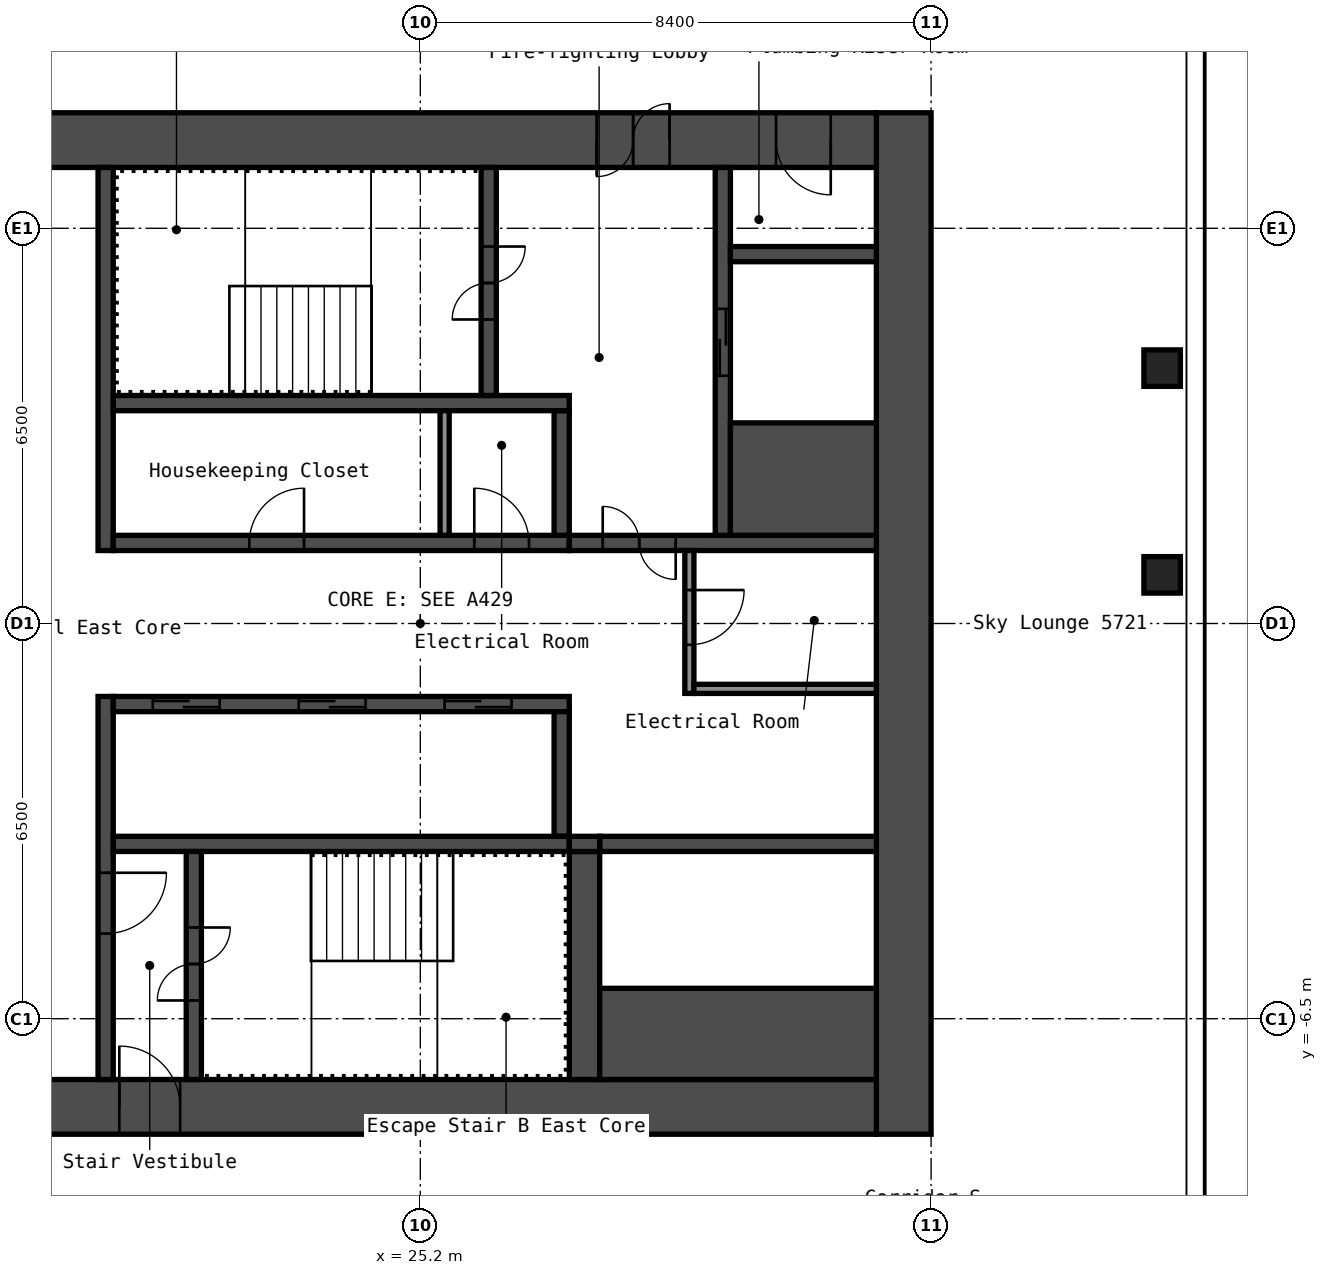
"""IFC4 building model, lengths in metres.
Left out: names, types, materials, properties, quantities, classifications, styles, units other than length and angle.
Written with IfcOpenShell. Run it as: python <this file> out.ifc"""

import sys

from ifc_helpers import new_model, si_unit, direction, frame, frame_2d, origin, origin_2d, place, context, subcontext, project, spatial, rectangle, hollow_rectangle, extrude, element, fill, save


model = new_model("IFC4")
c1 = context("Model", 3, precision=1e-05, world=origin(), true_north=direction((0.0, 1.0)))
c2 = subcontext(c1, "Body", "Model", "MODEL_VIEW")
j1 = project(units=[si_unit("LENGTHUNIT", "METRE"), si_unit("PLANEANGLEUNIT", "RADIAN")], contexts=[c1])
p1 = place(None, origin())
s1 = spatial("IfcSite", under=j1, at=p1, CompositionType="ELEMENT")
p2 = place(p1, origin())
s2 = spatial("IfcBuilding", under=s1, at=p2, CompositionType="ELEMENT")
p3 = place(p2, frame((0.0, 0.0, 202.6)))
s3 = spatial("IfcBuildingStorey", under=s2, at=p3, CompositionType="ELEMENT", Elevation=202.6)
for number, where, z_axis, x_axis in (
    (1, (37.4, 0.8, 0.0), (0.0, 0.0, 1.0), (1.0, 0.0, 0.0)),
    (2, (37.4, 4.2, 0.0), (0.0, 0.0, 1.0), (1.0, 0.0, 0.0)),
):
    element("IfcColumn", number, at=place(p3, frame(where, z_axis=z_axis, x_axis=x_axis)), inside=s3, PredefinedType="COLUMN", context=c2, shape_type="SweptSolid", body=[
        extrude(hollow_rectangle(XDim=0.6, YDim=0.6, WallThickness=0.025, InnerFilletRadius=0.038, OuterFilletRadius=0.062, at=origin_2d()), origin(), (0.0, 0.0, 1.0), 2.75),
    ])
p4 = place(p3, frame((33.15, -8.4, 0.0), z_axis=(0.0, 0.0, 1.0), x_axis=(0.0, 1.0, 0.0)))
e3 = element("IfcWall", 3, at=p4, inside=s3, PredefinedType="SHEAR", context=c2, shape_type="SweptSolid", body=[
    extrude(rectangle(XDim=16.8, YDim=0.9, at=frame_2d((8.4, 0.0))), origin(), (0.0, 0.0, 1.0), 2.75),
])
p5 = place(p3, frame((17.7, 7.95, 0.0), z_axis=(0.0, 0.0, 1.0), x_axis=(1.0, 0.0, 0.0)))
e4 = element("IfcWall", 4, at=p5, inside=s3, PredefinedType="SHEAR", context=c2, shape_type="SweptSolid", body=[
    extrude(rectangle(XDim=15.0, YDim=0.9, at=frame_2d((7.5, 0.0))), origin(), (0.0, 0.0, 1.0), 2.75),
])
p6 = place(p5, frame((10.4, 0.0, 0.0)))
e5 = element("IfcOpeningElement", 5, at=p6, cuts=e4, PredefinedType="OPENING", context=c2, shape_type="SweptSolid", body=[
    extrude(rectangle(XDim=1.2, YDim=2.1, at=frame_2d((0.6, 1.05))), frame((0.0, 0.46, 0.0), z_axis=(0.0, -1.0, 0.0), x_axis=(1.0, 0.0, 0.0)), (0.0, 0.0, 1.0), 0.92),
])
p7 = place(p5, frame((13.35, 0.0, 0.0)))
e6 = element("IfcOpeningElement", 6, at=p7, cuts=e4, PredefinedType="OPENING", context=c2, shape_type="SweptSolid", body=[
    extrude(rectangle(XDim=0.9, YDim=2.1, at=frame_2d((0.45, 1.05))), frame((0.0, 0.46, 0.0), z_axis=(0.0, -1.0, 0.0), x_axis=(1.0, 0.0, 0.0)), (0.0, 0.0, 1.0), 0.92),
])
p8 = place(p3, frame((17.7, -7.95, 0.0), z_axis=(0.0, 0.0, 1.0), x_axis=(1.0, 0.0, 0.0)))
e7 = element("IfcWall", 7, at=p8, inside=s3, PredefinedType="SHEAR", context=c2, shape_type="SweptSolid", body=[
    extrude(rectangle(XDim=15.0, YDim=0.9, at=frame_2d((7.5, 0.0))), origin(), (0.0, 0.0, 1.0), 2.75),
])
p9 = place(p8, frame((2.55, 0.0, 0.0)))
e8 = element("IfcOpeningElement", 8, at=p9, cuts=e7, PredefinedType="OPENING", context=c2, shape_type="SweptSolid", body=[
    extrude(rectangle(XDim=1.0, YDim=2.1, at=frame_2d((0.5, 1.05))), frame((0.0, 0.46, 0.0), z_axis=(0.0, -1.0, 0.0), x_axis=(1.0, 0.0, 0.0)), (0.0, 0.0, 1.0), 0.92),
])
p10 = place(p3, frame((20.025, 1.2, 0.0), z_axis=(0.0, 0.0, 1.0), x_axis=(0.0, 1.0, 0.0)))
e9 = element("IfcWall", 9, at=p10, inside=s3, PredefinedType="SHEAR", context=c2, shape_type="SweptSolid", body=[
    extrude(rectangle(XDim=6.3, YDim=0.25, at=frame_2d((3.15, 0.0))), origin(), (0.0, 0.0, 1.0), 2.75),
])
p11 = place(p3, frame((20.025, -7.5, 0.0), z_axis=(0.0, 0.0, 1.0), x_axis=(0.0, 1.0, 0.0)))
e10 = element("IfcWall", 10, at=p11, inside=s3, PredefinedType="SHEAR", context=c2, shape_type="SweptSolid", body=[
    extrude(rectangle(XDim=6.3, YDim=0.25, at=frame_2d((3.15, 0.0))), origin(), (0.0, 0.0, 1.0), 2.75),
])
p12 = place(p11, frame((2.4, 0.0, 0.0)))
e11 = element("IfcOpeningElement", 11, at=p12, cuts=e10, PredefinedType="OPENING", context=c2, shape_type="SweptSolid", body=[
    extrude(rectangle(XDim=1.0, YDim=2.1, at=frame_2d((0.5, 1.05))), frame((0.0, 0.135, 0.0), z_axis=(0.0, -1.0, 0.0), x_axis=(1.0, 0.0, 0.0)), (0.0, 0.0, 1.0), 0.27),
])
p13 = place(p3, frame((20.15, 1.325, 0.0), z_axis=(0.0, 0.0, 1.0), x_axis=(1.0, 0.0, 0.0)))
e12 = element("IfcWall", 12, at=p13, inside=s3, PredefinedType="SHEAR", context=c2, shape_type="SweptSolid", body=[
    extrude(rectangle(XDim=7.5, YDim=0.25, at=frame_2d((3.75, 0.0))), origin(), (0.0, 0.0, 1.0), 2.75),
])
p14 = place(p13, frame((2.238, 0.0, 0.0)))
e13 = element("IfcOpeningElement", 13, at=p14, cuts=e12, PredefinedType="OPENING", context=c2, shape_type="SweptSolid", body=[
    extrude(rectangle(XDim=0.9, YDim=2.1, at=frame_2d((0.45, 1.05))), frame((0.0, 0.135, 0.0), z_axis=(0.0, -1.0, 0.0), x_axis=(1.0, 0.0, 0.0)), (0.0, 0.0, 1.0), 0.27),
])
p15 = place(p13, frame((5.938, 0.0, 0.0)))
e14 = element("IfcOpeningElement", 14, at=p15, cuts=e12, PredefinedType="OPENING", context=c2, shape_type="SweptSolid", body=[
    extrude(rectangle(XDim=0.9, YDim=2.1, at=frame_2d((0.45, 1.05))), frame((0.0, 0.135, 0.0), z_axis=(0.0, -1.0, 0.0), x_axis=(1.0, 0.0, 0.0)), (0.0, 0.0, 1.0), 0.27),
])
p16 = place(p3, frame((27.525, 1.45, 0.0), z_axis=(0.0, 0.0, 1.0), x_axis=(0.0, 1.0, 0.0)))
e15 = element("IfcWall", 15, at=p16, inside=s3, PredefinedType="SHEAR", context=c2, shape_type="SweptSolid", body=[
    extrude(rectangle(XDim=2.05, YDim=0.25, at=frame_2d((1.025, 0.0))), origin(), (0.0, 0.0, 1.0), 2.75),
])
p17 = place(p3, frame((20.15, 3.625, 0.0), z_axis=(0.0, 0.0, 1.0), x_axis=(1.0, 0.0, 0.0)))
e16 = element("IfcWall", 16, at=p17, inside=s3, PredefinedType="SHEAR", context=c2, shape_type="SweptSolid", body=[
    extrude(rectangle(XDim=7.5, YDim=0.25, at=frame_2d((3.75, 0.0))), origin(), (0.0, 0.0, 1.0), 2.75),
])
p18 = place(p3, frame((26.325, 3.75, 0.0), z_axis=(0.0, 0.0, 1.0), x_axis=(0.0, 1.0, 0.0)))
e17 = element("IfcWall", 17, at=p18, inside=s3, PredefinedType="SHEAR", context=c2, shape_type="SweptSolid", body=[
    extrude(rectangle(XDim=3.75, YDim=0.25, at=frame_2d((1.875, 0.0))), origin(), (0.0, 0.0, 1.0), 2.75),
])
p19 = place(p18, frame((1.25, 0.0, 0.0)))
e18 = element("IfcOpeningElement", 18, at=p19, cuts=e17, PredefinedType="OPENING", context=c2, shape_type="SweptSolid", body=[
    extrude(rectangle(XDim=1.2, YDim=2.1, at=frame_2d((0.6, 1.05))), frame((0.0, 0.135, 0.0), z_axis=(0.0, -1.0, 0.0), x_axis=(1.0, 0.0, 0.0)), (0.0, 0.0, 1.0), 0.27),
])
p20 = place(p3, frame((27.65, 1.325, 0.0), z_axis=(0.0, 0.0, 1.0), x_axis=(1.0, 0.0, 0.0)))
e19 = element("IfcWall", 19, at=p20, inside=s3, PredefinedType="SHEAR", context=c2, shape_type="SweptSolid", body=[
    extrude(rectangle(XDim=5.05, YDim=0.25, at=frame_2d((2.525, 0.0))), origin(), (0.0, 0.0, 1.0), 2.75),
])
p21 = place(p20, frame((0.55, 0.0, 0.0)))
e20 = element("IfcOpeningElement", 20, at=p21, cuts=e19, PredefinedType="OPENING", context=c2, shape_type="SweptSolid", body=[
    extrude(rectangle(XDim=1.2, YDim=2.1, at=frame_2d((0.6, 1.05))), frame((0.0, 0.135, 0.0), z_axis=(0.0, -1.0, 0.0), x_axis=(1.0, 0.0, 0.0)), (0.0, 0.0, 1.0), 0.27),
])
p22 = place(p3, frame((30.175, 1.45, 0.0), z_axis=(0.0, 0.0, 1.0), x_axis=(0.0, 1.0, 0.0)))
e21 = element("IfcWall", 21, at=p22, inside=s3, PredefinedType="SHEAR", context=c2, shape_type="SweptSolid", body=[
    extrude(rectangle(XDim=6.05, YDim=0.25, at=frame_2d((3.025, 0.0))), origin(), (0.0, 0.0, 1.0), 2.75),
])
p23 = place(p22, frame((2.625, 0.0, 0.0)))
e22 = element("IfcOpeningElement", 22, at=p23, cuts=e21, PredefinedType="OPENING", context=c2, shape_type="SweptSolid", body=[
    extrude(rectangle(XDim=1.1, YDim=2.1, at=frame_2d((0.55, 1.05))), frame((0.0, 0.135, 0.0), z_axis=(0.0, -1.0, 0.0), x_axis=(1.0, 0.0, 0.0)), (0.0, 0.0, 1.0), 0.27),
])
p24 = place(p3, frame((30.3, 2.375, 0.0), z_axis=(0.0, 0.0, 1.0), x_axis=(1.0, 0.0, 0.0)))
e23 = element("IfcWall", 23, at=p24, inside=s3, PredefinedType="SHEAR", context=c2, shape_type="SweptSolid", body=[
    extrude(rectangle(XDim=2.4, YDim=1.85, at=frame_2d((1.2, 0.0))), origin(), (0.0, 0.0, 1.0), 2.75),
])
p25 = place(p3, frame((30.3, 6.075, 0.0), z_axis=(0.0, 0.0, 1.0), x_axis=(1.0, 0.0, 0.0)))
e24 = element("IfcWall", 24, at=p25, inside=s3, PredefinedType="SHEAR", context=c2, shape_type="SweptSolid", body=[
    extrude(rectangle(XDim=2.4, YDim=0.25, at=frame_2d((1.2, 0.0))), origin(), (0.0, 0.0, 1.0), 2.75),
])
p26 = place(p3, frame((20.15, -1.325, 0.0), z_axis=(0.0, 0.0, 1.0), x_axis=(1.0, 0.0, 0.0)))
e25 = element("IfcWall", 25, at=p26, inside=s3, PredefinedType="SHEAR", context=c2, shape_type="SweptSolid", body=[
    extrude(rectangle(XDim=7.5, YDim=0.25, at=frame_2d((3.75, 0.0))), origin(), (0.0, 0.0, 1.0), 2.75),
])
p27 = place(p26, frame((0.65, 0.0, 0.0)))
e26 = element("IfcOpeningElement", 26, at=p27, cuts=e25, PredefinedType="OPENING", context=c2, shape_type="SweptSolid", body=[
    extrude(rectangle(XDim=1.1, YDim=2.1, at=frame_2d((0.55, 1.05))), frame((0.0, 0.135, 0.0), z_axis=(0.0, -1.0, 0.0), x_axis=(1.0, 0.0, 0.0)), (0.0, 0.0, 1.0), 0.27),
])
p28 = place(p26, frame((3.05, 0.0, 0.0)))
e27 = element("IfcOpeningElement", 27, at=p28, cuts=e25, PredefinedType="OPENING", context=c2, shape_type="SweptSolid", body=[
    extrude(rectangle(XDim=1.1, YDim=2.1, at=frame_2d((0.55, 1.05))), frame((0.0, 0.135, 0.0), z_axis=(0.0, -1.0, 0.0), x_axis=(1.0, 0.0, 0.0)), (0.0, 0.0, 1.0), 0.27),
])
p29 = place(p26, frame((5.45, 0.0, 0.0)))
e28 = element("IfcOpeningElement", 28, at=p29, cuts=e25, PredefinedType="OPENING", context=c2, shape_type="SweptSolid", body=[
    extrude(rectangle(XDim=1.1, YDim=2.1, at=frame_2d((0.55, 1.05))), frame((0.0, 0.135, 0.0), z_axis=(0.0, -1.0, 0.0), x_axis=(1.0, 0.0, 0.0)), (0.0, 0.0, 1.0), 0.27),
])
p30 = place(p3, frame((27.525, -3.5, 0.0), z_axis=(0.0, 0.0, 1.0), x_axis=(0.0, 1.0, 0.0)))
e29 = element("IfcWall", 29, at=p30, inside=s3, PredefinedType="SHEAR", context=c2, shape_type="SweptSolid", body=[
    extrude(rectangle(XDim=2.05, YDim=0.25, at=frame_2d((1.025, 0.0))), origin(), (0.0, 0.0, 1.0), 2.75),
])
p31 = place(p3, frame((20.15, -3.625, 0.0), z_axis=(0.0, 0.0, 1.0), x_axis=(1.0, 0.0, 0.0)))
e30 = element("IfcWall", 30, at=p31, inside=s3, PredefinedType="SHEAR", context=c2, shape_type="SweptSolid", body=[
    extrude(rectangle(XDim=7.5, YDim=0.25, at=frame_2d((3.75, 0.0))), origin(), (0.0, 0.0, 1.0), 2.75),
])
p32 = place(p3, frame((21.475, -7.5, 0.0), z_axis=(0.0, 0.0, 1.0), x_axis=(0.0, 1.0, 0.0)))
e31 = element("IfcWall", 31, at=p32, inside=s3, PredefinedType="SHEAR", context=c2, shape_type="SweptSolid", body=[
    extrude(rectangle(XDim=3.75, YDim=0.25, at=frame_2d((1.875, 0.0))), origin(), (0.0, 0.0, 1.0), 2.75),
])
p33 = place(p32, frame((1.3, 0.0, 0.0)))
e32 = element("IfcOpeningElement", 32, at=p33, cuts=e31, PredefinedType="OPENING", context=c2, shape_type="SweptSolid", body=[
    extrude(rectangle(XDim=1.2, YDim=2.1, at=frame_2d((0.6, 1.05))), frame((0.0, 0.135, 0.0), z_axis=(0.0, -1.0, 0.0), x_axis=(1.0, 0.0, 0.0)), (0.0, 0.0, 1.0), 0.27),
])
p34 = place(p3, frame((27.9, -7.5, 0.0), z_axis=(0.0, 0.0, 1.0), x_axis=(0.0, 1.0, 0.0)))
e33 = element("IfcWall", 33, at=p34, inside=s3, PredefinedType="SHEAR", context=c2, shape_type="SweptSolid", body=[
    extrude(rectangle(XDim=3.75, YDim=0.5, at=frame_2d((1.875, 0.0))), origin(), (0.0, 0.0, 1.0), 2.75),
])
p35 = place(p3, frame((28.15, -3.625, 0.0), z_axis=(0.0, 0.0, 1.0), x_axis=(1.0, 0.0, 0.0)))
e34 = element("IfcWall", 34, at=p35, inside=s3, PredefinedType="SHEAR", context=c2, shape_type="SweptSolid", body=[
    extrude(rectangle(XDim=4.55, YDim=0.25, at=frame_2d((2.275, 0.0))), origin(), (0.0, 0.0, 1.0), 2.75),
])
p36 = place(p3, frame((28.15, -6.75, 0.0), z_axis=(0.0, 0.0, 1.0), x_axis=(1.0, 0.0, 0.0)))
e35 = element("IfcWall", 35, at=p36, inside=s3, PredefinedType="SHEAR", context=c2, shape_type="SweptSolid", body=[
    extrude(rectangle(XDim=4.55, YDim=1.5, at=frame_2d((2.275, 0.0))), origin(), (0.0, 0.0, 1.0), 2.75),
])
p37 = place(p3, frame((27.65, -3.625, 0.0), z_axis=(0.0, 0.0, 1.0), x_axis=(1.0, 0.0, 0.0)))
e36 = element("IfcWall", 36, at=p37, inside=s3, PredefinedType="SHEAR", context=c2, shape_type="SweptSolid", body=[
    extrude(rectangle(XDim=0.5, YDim=0.25, at=frame_2d((0.25, 0.0))), origin(), (0.0, 0.0, 1.0), 2.75),
])
p38 = place(p3, frame((29.625, -1.15, 0.0), z_axis=(0.0, 0.0, 1.0), x_axis=(0.0, 1.0, 0.0)))
e37 = element("IfcWall", 37, at=p38, inside=s3, PredefinedType="PARTITIONING", context=c2, shape_type="SweptSolid", body=[
    extrude(rectangle(XDim=2.35, YDim=0.15, at=frame_2d((1.175, 0.0))), origin(), (0.0, 0.0, 1.0), 2.75),
])
p39 = place(p38, frame((0.8, 0.0, 0.0)))
e38 = element("IfcOpeningElement", 38, at=p39, cuts=e37, PredefinedType="OPENING", context=c2, shape_type="SweptSolid", body=[
    extrude(rectangle(XDim=0.9, YDim=2.1, at=frame_2d((0.45, 1.05))), frame((0.0, 0.085, 0.0), z_axis=(0.0, -1.0, 0.0), x_axis=(1.0, 0.0, 0.0)), (0.0, 0.0, 1.0), 0.17),
])
p40 = place(p3, frame((29.7, -1.075, 0.0), z_axis=(0.0, 0.0, 1.0), x_axis=(1.0, 0.0, 0.0)))
e39 = element("IfcWall", 39, at=p40, inside=s3, PredefinedType="PARTITIONING", context=c2, shape_type="SweptSolid", body=[
    extrude(rectangle(XDim=3.0, YDim=0.15, at=frame_2d((1.5, 0.0))), origin(), (0.0, 0.0, 1.0), 2.75),
])
p41 = place(p3, frame((25.6, 1.45, 0.0), z_axis=(0.0, 0.0, 1.0), x_axis=(0.0, 1.0, 0.0)))
e40 = element("IfcWall", 40, at=p41, inside=s3, PredefinedType="PARTITIONING", context=c2, shape_type="SweptSolid", body=[
    extrude(rectangle(XDim=2.05, YDim=0.15, at=frame_2d((1.025, 0.0))), origin(), (0.0, 0.0, 1.0), 2.75),
])
p42 = place(p6, origin())
e41 = element("IfcDoor", 41, at=p42, inside=s3, OperationType="DOUBLE_DOOR_SINGLE_SWING", PredefinedType="DOOR", context=c2, shape_type="SweptSolid", body=[
    extrude(rectangle(XDim=1.2, YDim=2.1, at=frame_2d((0.6, 1.05))), frame((0.0, 0.025, 0.0), z_axis=(0.0, -1.0, 0.0), x_axis=(1.0, 0.0, 0.0)), (0.0, 0.0, 1.0), 0.05),
])
fill(e5, e41)
p43 = place(p7, origin())
e42 = element("IfcDoor", 42, at=p43, inside=s3, OperationType="SINGLE_SWING_RIGHT", PredefinedType="DOOR", context=c2, shape_type="SweptSolid", body=[
    extrude(rectangle(XDim=0.9, YDim=2.1, at=frame_2d((0.45, 1.05))), frame((0.0, 0.025, 0.0), z_axis=(0.0, -1.0, 0.0), x_axis=(1.0, 0.0, 0.0)), (0.0, 0.0, 1.0), 0.05),
])
fill(e6, e42)
p44 = place(p9, origin())
e43 = element("IfcDoor", 43, at=p44, inside=s3, OperationType="SINGLE_SWING_RIGHT", PredefinedType="DOOR", context=c2, shape_type="SweptSolid", body=[
    extrude(rectangle(XDim=1.0, YDim=2.1, at=frame_2d((0.5, 1.05))), frame((0.0, 0.025, 0.0), z_axis=(0.0, -1.0, 0.0), x_axis=(1.0, 0.0, 0.0)), (0.0, 0.0, 1.0), 0.05),
])
fill(e8, e43)
p45 = place(p19, origin())
e44 = element("IfcDoor", 44, at=p45, inside=s3, OperationType="DOUBLE_DOOR_SINGLE_SWING", PredefinedType="DOOR", context=c2, shape_type="SweptSolid", body=[
    extrude(rectangle(XDim=1.2, YDim=2.1, at=frame_2d((0.6, 1.05))), frame((0.0, 0.025, 0.0), z_axis=(0.0, -1.0, 0.0), x_axis=(1.0, 0.0, 0.0)), (0.0, 0.0, 1.0), 0.05),
])
fill(e18, e44)
p46 = place(p33, origin())
e45 = element("IfcDoor", 45, at=p46, inside=s3, OperationType="DOUBLE_DOOR_SINGLE_SWING", PredefinedType="DOOR", context=c2, shape_type="SweptSolid", body=[
    extrude(rectangle(XDim=1.2, YDim=2.1, at=frame_2d((0.6, 1.05))), frame((0.0, 0.025, 0.0), z_axis=(0.0, -1.0, 0.0), x_axis=(1.0, 0.0, 0.0)), (0.0, 0.0, 1.0), 0.05),
])
fill(e32, e45)
p47 = place(p12, origin())
e46 = element("IfcDoor", 46, at=p47, inside=s3, OperationType="SINGLE_SWING_RIGHT", PredefinedType="DOOR", context=c2, shape_type="SweptSolid", body=[
    extrude(rectangle(XDim=1.0, YDim=2.1, at=frame_2d((0.5, 1.05))), frame((0.0, 0.025, 0.0), z_axis=(0.0, -1.0, 0.0), x_axis=(1.0, 0.0, 0.0)), (0.0, 0.0, 1.0), 0.05),
])
fill(e11, e46)
p48 = place(p21, origin())
e47 = element("IfcDoor", 47, at=p48, inside=s3, OperationType="DOUBLE_DOOR_SINGLE_SWING", PredefinedType="DOOR", context=c2, shape_type="SweptSolid", body=[
    extrude(rectangle(XDim=1.2, YDim=2.1, at=frame_2d((0.6, 1.05))), frame((0.0, 0.025, 0.0), z_axis=(0.0, -1.0, 0.0), x_axis=(1.0, 0.0, 0.0)), (0.0, 0.0, 1.0), 0.05),
])
fill(e20, e47)
p49 = place(p39, origin())
e48 = element("IfcDoor", 48, at=p49, inside=s3, OperationType="SINGLE_SWING_RIGHT", PredefinedType="DOOR", context=c2, shape_type="SweptSolid", body=[
    extrude(rectangle(XDim=0.9, YDim=2.1, at=frame_2d((0.45, 1.05))), frame((0.0, 0.025, 0.0), z_axis=(0.0, -1.0, 0.0), x_axis=(1.0, 0.0, 0.0)), (0.0, 0.0, 1.0), 0.05),
])
fill(e38, e48)
p50 = place(p14, origin())
e49 = element("IfcDoor", 49, at=p50, inside=s3, OperationType="SINGLE_SWING_LEFT", PredefinedType="DOOR", context=c2, shape_type="SweptSolid", body=[
    extrude(rectangle(XDim=0.9, YDim=2.1, at=frame_2d((0.45, 1.05))), frame((0.0, 0.025, 0.0), z_axis=(0.0, -1.0, 0.0), x_axis=(1.0, 0.0, 0.0)), (0.0, 0.0, 1.0), 0.05),
])
fill(e13, e49)
p51 = place(p15, origin())
e50 = element("IfcDoor", 50, at=p51, inside=s3, OperationType="SINGLE_SWING_RIGHT", PredefinedType="DOOR", context=c2, shape_type="SweptSolid", body=[
    extrude(rectangle(XDim=0.9, YDim=2.1, at=frame_2d((0.45, 1.05))), frame((0.0, 0.025, 0.0), z_axis=(0.0, -1.0, 0.0), x_axis=(1.0, 0.0, 0.0)), (0.0, 0.0, 1.0), 0.05),
])
fill(e14, e50)
p52 = place(p27, origin())
e51 = element("IfcDoor", 51, at=p52, inside=s3, OperationType="DOUBLE_DOOR_SLIDING", PredefinedType="DOOR", context=c2, shape_type="SweptSolid", body=[
    extrude(rectangle(XDim=1.1, YDim=2.1, at=frame_2d((0.55, 1.05))), frame((0.0, 0.025, 0.0), z_axis=(0.0, -1.0, 0.0), x_axis=(1.0, 0.0, 0.0)), (0.0, 0.0, 1.0), 0.05),
])
fill(e26, e51)
p53 = place(p28, origin())
e52 = element("IfcDoor", 52, at=p53, inside=s3, OperationType="DOUBLE_DOOR_SLIDING", PredefinedType="DOOR", context=c2, shape_type="SweptSolid", body=[
    extrude(rectangle(XDim=1.1, YDim=2.1, at=frame_2d((0.55, 1.05))), frame((0.0, 0.025, 0.0), z_axis=(0.0, -1.0, 0.0), x_axis=(1.0, 0.0, 0.0)), (0.0, 0.0, 1.0), 0.05),
])
fill(e27, e52)
p54 = place(p29, origin())
e53 = element("IfcDoor", 53, at=p54, inside=s3, OperationType="DOUBLE_DOOR_SLIDING", PredefinedType="DOOR", context=c2, shape_type="SweptSolid", body=[
    extrude(rectangle(XDim=1.1, YDim=2.1, at=frame_2d((0.55, 1.05))), frame((0.0, 0.025, 0.0), z_axis=(0.0, -1.0, 0.0), x_axis=(1.0, 0.0, 0.0)), (0.0, 0.0, 1.0), 0.05),
])
fill(e28, e53)
p55 = place(p23, origin())
e54 = element("IfcDoor", 54, at=p55, inside=s3, OperationType="DOUBLE_DOOR_SLIDING", PredefinedType="DOOR", context=c2, shape_type="SweptSolid", body=[
    extrude(rectangle(XDim=1.1, YDim=2.1, at=frame_2d((0.55, 1.05))), frame((0.0, 0.025, 0.0), z_axis=(0.0, -1.0, 0.0), x_axis=(1.0, 0.0, 0.0)), (0.0, 0.0, 1.0), 0.05),
])
fill(e22, e54)
save(model, sys.argv[1])
